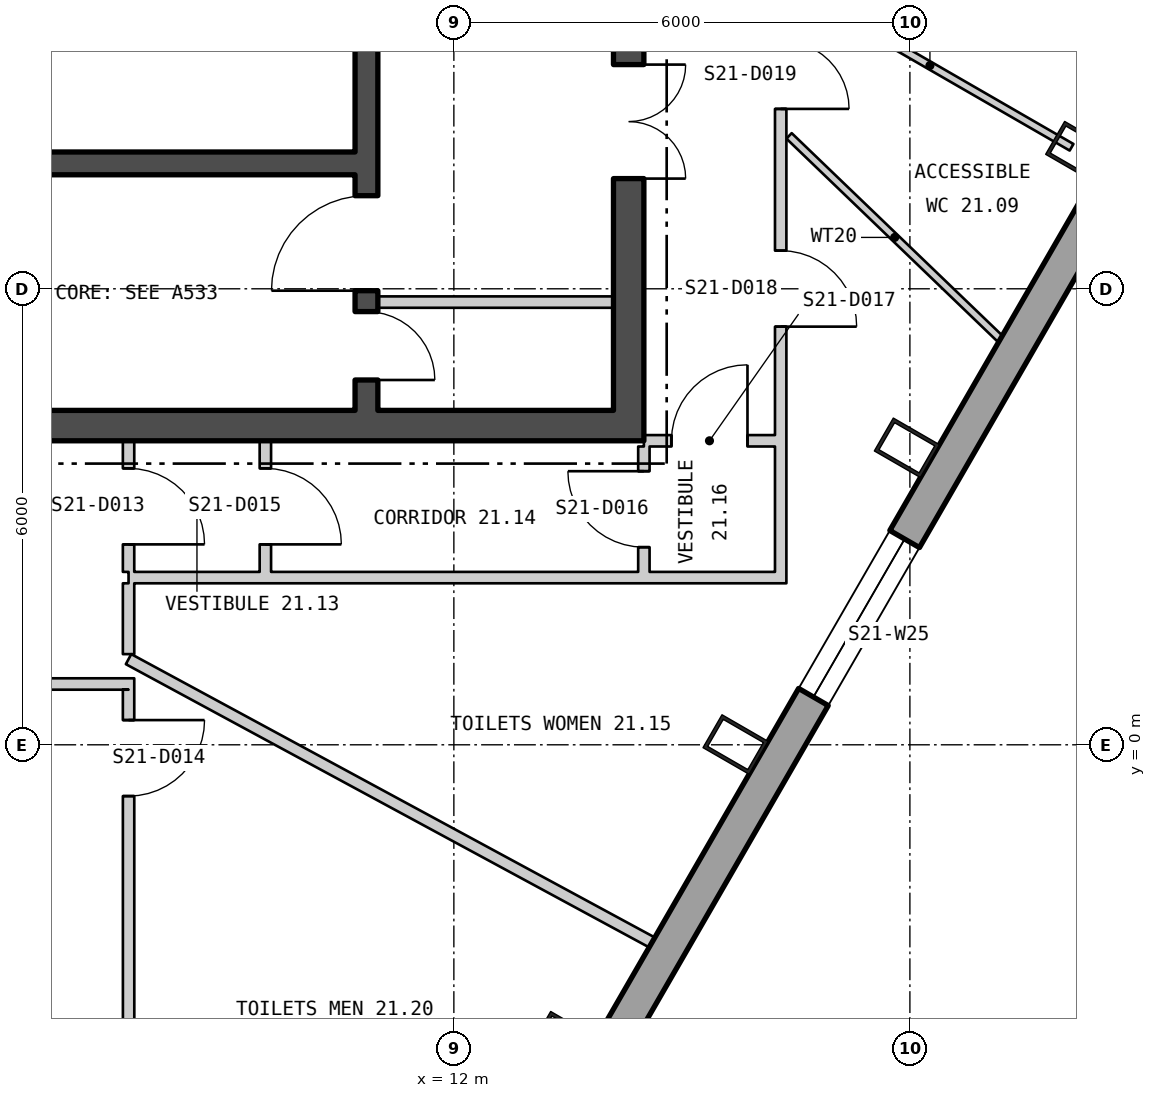
"""IFC4 building model, lengths in metres.
Left out: names, types, materials, properties, quantities, classifications, styles, units other than length and angle.
Written with IfcOpenShell. Run it as: python <this file> out.ifc"""

import sys

from ifc_helpers import new_model, si_unit, direction, frame, frame_2d, origin, origin_2d, place, context, subcontext, project, spatial, polyline, rectangle, hollow_rectangle, outline, extrude, element, fill, save


model = new_model("IFC4")
c1 = context("Model", 3, precision=1e-05, world=origin(), true_north=direction((0.0, 1.0)))
c2 = subcontext(c1, "Body", "Model", "MODEL_VIEW")
j1 = project(units=[si_unit("LENGTHUNIT", "METRE"), si_unit("PLANEANGLEUNIT", "RADIAN")], contexts=[c1])
p1 = place(None, origin())
s1 = spatial("IfcSite", under=j1, at=p1, CompositionType="ELEMENT")
p2 = place(p1, origin())
s2 = spatial("IfcBuilding", under=s1, at=p2, CompositionType="ELEMENT")
p3 = place(p2, frame((0.0, 0.0, 280.5)))
s3 = spatial("IfcBuildingStorey", under=s2, at=p3, CompositionType="ELEMENT", Elevation=280.5)
for number, where, z_axis, x_axis in (
    (1, (13.452, -3.9, 0.0), (0.0, 0.0, 1.0), (0.5, 0.866, 0.0)),
    (2, (15.706, 0.004, 0.0), (0.0, 0.0, 1.0), (0.5, 0.866, 0.0)),
    (3, (17.96, 3.908, 0.0), (0.0, 0.0, 1.0), (0.5, 0.866, 0.0)),
    (4, (20.214, 7.811, 0.0), (0.0, 0.0, 1.0), (0.5, 0.866, 0.0)),
):
    element("IfcColumn", number, at=place(p3, frame(where, z_axis=z_axis, x_axis=x_axis)), inside=s3, PredefinedType="COLUMN", context=c2, shape_type="SweptSolid", body=[
        extrude(hollow_rectangle(XDim=0.5, YDim=0.7, WallThickness=0.045, at=origin_2d()), origin(), (0.0, 0.0, 1.0), 3.9),
    ])
p4 = place(p3, frame((2.515, -23.993, -0.18), z_axis=(0.0, 0.0, 1.0), x_axis=(0.500000711659, 0.866024992908, 0.0)))
e5 = element("IfcWall", 5, at=p4, inside=s3, PredefinedType="SOLIDWALL", context=c2, shape_type="SweptSolid", body=[
    extrude(outline(polyline([(-0.13, -0.225), (45.87, -0.225), (45.61, 0.225), (0.13, 0.225), (-0.13, -0.225)])), origin(), (0.0, 0.0, 1.0), 3.68),
])
p5 = place(p4, frame((1.424, 0.0, 1.08)))
e6 = element("IfcOpeningElement", 6, at=p5, cuts=e5, PredefinedType="OPENING", context=c2, shape_type="SweptSolid", body=[
    extrude(rectangle(XDim=2.4, YDim=2.0, at=frame_2d((1.2, 1.0))), frame((0.0, 0.235, 0.0), z_axis=(0.0, -1.0, 0.0), x_axis=(1.0, 0.0, 0.0)), (0.0, 0.0, 1.0), 0.47),
])
p6 = place(p4, frame((5.893, 0.0, 1.08)))
e7 = element("IfcOpeningElement", 7, at=p6, cuts=e5, PredefinedType="OPENING", context=c2, shape_type="SweptSolid", body=[
    extrude(rectangle(XDim=2.4, YDim=2.0, at=frame_2d((1.2, 1.0))), frame((0.0, 0.235, 0.0), z_axis=(0.0, -1.0, 0.0), x_axis=(1.0, 0.0, 0.0)), (0.0, 0.0, 1.0), 0.47),
])
p7 = place(p4, frame((10.401, 0.0, 1.08)))
e8 = element("IfcOpeningElement", 8, at=p7, cuts=e5, PredefinedType="OPENING", context=c2, shape_type="SweptSolid", body=[
    extrude(rectangle(XDim=2.4, YDim=2.0, at=frame_2d((1.2, 1.0))), frame((0.0, 0.235, 0.0), z_axis=(0.0, -1.0, 0.0), x_axis=(1.0, 0.0, 0.0)), (0.0, 0.0, 1.0), 0.47),
])
p8 = place(p4, frame((14.909, 0.0, 1.08)))
e9 = element("IfcOpeningElement", 9, at=p8, cuts=e5, PredefinedType="OPENING", context=c2, shape_type="SweptSolid", body=[
    extrude(rectangle(XDim=2.4, YDim=2.0, at=frame_2d((1.2, 1.0))), frame((0.0, 0.235, 0.0), z_axis=(0.0, -1.0, 0.0), x_axis=(1.0, 0.0, 0.0)), (0.0, 0.0, 1.0), 0.47),
])
p9 = place(p4, frame((19.416, 0.0, 1.08)))
e10 = element("IfcOpeningElement", 10, at=p9, cuts=e5, PredefinedType="OPENING", context=c2, shape_type="SweptSolid", body=[
    extrude(rectangle(XDim=2.4, YDim=2.0, at=frame_2d((1.2, 1.0))), frame((0.0, 0.235, 0.0), z_axis=(0.0, -1.0, 0.0), x_axis=(1.0, 0.0, 0.0)), (0.0, 0.0, 1.0), 0.47),
])
p10 = place(p4, frame((28.431, 0.0, 1.08)))
e11 = element("IfcOpeningElement", 11, at=p10, cuts=e5, PredefinedType="OPENING", context=c2, shape_type="SweptSolid", body=[
    extrude(rectangle(XDim=2.4, YDim=2.0, at=frame_2d((1.2, 1.0))), frame((0.0, 0.235, 0.0), z_axis=(0.0, -1.0, 0.0), x_axis=(1.0, 0.0, 0.0)), (0.0, 0.0, 1.0), 0.47),
])
p11 = place(p4, frame((37.447, 0.0, 1.08)))
e12 = element("IfcOpeningElement", 12, at=p11, cuts=e5, PredefinedType="OPENING", context=c2, shape_type="SweptSolid", body=[
    extrude(rectangle(XDim=2.4, YDim=2.0, at=frame_2d((1.2, 1.0))), frame((0.0, 0.235, 0.0), z_axis=(0.0, -1.0, 0.0), x_axis=(1.0, 0.0, 0.0)), (0.0, 0.0, 1.0), 0.47),
])
p12 = place(p4, frame((41.916, 0.0, 1.08)))
e13 = element("IfcOpeningElement", 13, at=p12, cuts=e5, PredefinedType="OPENING", context=c2, shape_type="SweptSolid", body=[
    extrude(rectangle(XDim=2.4, YDim=2.0, at=frame_2d((1.2, 1.0))), frame((0.0, 0.235, 0.0), z_axis=(0.0, -1.0, 0.0), x_axis=(1.0, 0.0, 0.0)), (0.0, 0.0, 1.0), 0.47),
])
p13 = place(p3, frame((-14.5, 4.2, 0.0), z_axis=(0.0, 0.0, 1.0), x_axis=(1.0, 0.0, 0.0)))
e14 = element("IfcWall", 14, at=p13, inside=s3, PredefinedType="SHEAR", context=c2, shape_type="SweptSolid", body=[
    extrude(rectangle(XDim=29.0, YDim=0.4, at=frame_2d((14.5, 0.0))), origin(), (0.0, 0.0, 1.0), 3.7),
])
p14 = place(p13, frame((9.0, 0.0, 0.0)))
e15 = element("IfcOpeningElement", 15, at=p14, cuts=e14, PredefinedType="OPENING", context=c2, shape_type="SweptSolid", body=[
    extrude(rectangle(XDim=1.8, YDim=2.4, at=frame_2d((0.9, 1.2))), frame((0.0, 0.21, 0.0), z_axis=(0.0, -1.0, 0.0), x_axis=(1.0, 0.0, 0.0)), (0.0, 0.0, 1.0), 0.42),
])
p15 = place(p13, frame((19.0, 0.0, 0.0)))
e16 = element("IfcOpeningElement", 16, at=p15, cuts=e14, PredefinedType="OPENING", context=c2, shape_type="SweptSolid", body=[
    extrude(rectangle(XDim=1.8, YDim=2.4, at=frame_2d((0.9, 1.2))), frame((0.0, 0.21, 0.0), z_axis=(0.0, -1.0, 0.0), x_axis=(1.0, 0.0, 0.0)), (0.0, 0.0, 1.0), 0.42),
])
p16 = place(p3, frame((14.3, 4.4, 0.0), z_axis=(0.0, 0.0, 1.0), x_axis=(0.0, 1.0, 0.0)))
e17 = element("IfcWall", 17, at=p16, inside=s3, PredefinedType="SHEAR", context=c2, shape_type="SweptSolid", body=[
    extrude(rectangle(XDim=13.2, YDim=0.4, at=frame_2d((6.6, 0.0))), origin(), (0.0, 0.0, 1.0), 3.7),
])
p17 = place(p16, frame((3.05, 0.0, 0.0)))
e18 = element("IfcOpeningElement", 18, at=p17, cuts=e17, PredefinedType="OPENING", context=c2, shape_type="SweptSolid", body=[
    extrude(rectangle(XDim=1.5, YDim=2.1, at=frame_2d((0.75, 1.05))), frame((0.0, 0.21, 0.0), z_axis=(0.0, -1.0, 0.0), x_axis=(1.0, 0.0, 0.0)), (0.0, 0.0, 1.0), 0.42),
])
p18 = place(p3, frame((10.85, 4.4, 0.0), z_axis=(0.0, 0.0, 1.0), x_axis=(0.0, 1.0, 0.0)))
e19 = element("IfcWall", 19, at=p18, inside=s3, PredefinedType="SHEAR", context=c2, shape_type="SweptSolid", body=[
    extrude(rectangle(XDim=13.2, YDim=0.3, at=frame_2d((6.6, 0.0))), origin(), (0.0, 0.0, 1.0), 3.7),
])
p19 = place(p18, frame((1.575, 0.0, 0.0)))
e20 = element("IfcOpeningElement", 20, at=p19, cuts=e19, PredefinedType="OPENING", context=c2, shape_type="SweptSolid", body=[
    extrude(rectangle(XDim=1.25, YDim=2.1, at=frame_2d((0.625, 1.05))), frame((0.0, 0.16, 0.0), z_axis=(0.0, -1.0, 0.0), x_axis=(1.0, 0.0, 0.0)), (0.0, 0.0, 1.0), 0.32),
])
p20 = place(p18, frame((0.4, 0.0, 0.0)))
e21 = element("IfcOpeningElement", 21, at=p20, cuts=e19, PredefinedType="OPENING", context=c2, shape_type="SweptSolid", body=[
    extrude(rectangle(XDim=0.9, YDim=2.1, at=frame_2d((0.45, 1.05))), frame((0.0, 0.16, 0.0), z_axis=(0.0, -1.0, 0.0), x_axis=(1.0, 0.0, 0.0)), (0.0, 0.0, 1.0), 0.32),
])
p21 = place(p3, frame((2.6, 7.65, 0.0), z_axis=(0.0, 0.0, 1.0), x_axis=(1.0, 0.0, 0.0)))
e22 = element("IfcWall", 22, at=p21, inside=s3, PredefinedType="SHEAR", context=c2, shape_type="SweptSolid", body=[
    extrude(rectangle(XDim=8.1, YDim=0.3, at=frame_2d((4.05, 0.0))), origin(), (0.0, 0.0, 1.0), 3.7),
])
p22 = place(p3, frame((11.0, 5.825, 0.0), z_axis=(0.0, 0.0, 1.0), x_axis=(1.0, 0.0, 0.0)))
e23 = element("IfcWall", 23, at=p22, inside=s3, PredefinedType="PARTITIONING", context=c2, shape_type="SweptSolid", body=[
    extrude(rectangle(XDim=3.1, YDim=0.15, at=frame_2d((1.55, 0.0))), origin(), (0.0, 0.0, 1.0), 3.7),
])
p23 = place(p3, frame((-7.72, 0.8, 0.0), z_axis=(0.0, 0.0, 1.0), x_axis=(1.0, 0.0, 0.0)))
e24 = element("IfcWall", 24, at=p23, inside=s3, PredefinedType="PARTITIONING", context=c2, shape_type="SweptSolid", body=[
    extrude(rectangle(XDim=15.515, YDim=0.15, at=frame_2d((7.758, 0.0))), origin(), (0.0, 0.0, 1.0), 3.7),
])
p24 = place(p23, frame((1.206, 0.0, 0.0)))
e25 = element("IfcOpeningElement", 25, at=p24, cuts=e24, PredefinedType="OPENING", context=c2, shape_type="SweptSolid", body=[
    extrude(rectangle(XDim=1.0, YDim=2.1, at=frame_2d((0.5, 1.05))), frame((0.0, 0.085, 0.0), z_axis=(0.0, -1.0, 0.0), x_axis=(1.0, 0.0, 0.0)), (0.0, 0.0, 1.0), 0.17),
])
p25 = place(p23, frame((13.234, 0.0, 0.0)))
e26 = element("IfcOpeningElement", 26, at=p25, cuts=e24, PredefinedType="OPENING", context=c2, shape_type="SweptSolid", body=[
    extrude(rectangle(XDim=1.0, YDim=2.1, at=frame_2d((0.5, 1.05))), frame((0.0, 0.085, 0.0), z_axis=(0.0, -1.0, 0.0), x_axis=(1.0, 0.0, 0.0)), (0.0, 0.0, 1.0), 0.17),
])
p26 = place(p3, frame((7.72, 1.127, 0.0), z_axis=(0.0, 0.0, 1.0), x_axis=(0.879447920674, -0.475995120586, 0.0)))
e27 = element("IfcWall", 27, at=p26, inside=s3, PredefinedType="PARTITIONING", context=c2, shape_type="SweptSolid", body=[
    extrude(rectangle(XDim=7.83, YDim=0.15, at=frame_2d((3.915, 0.0))), origin(), (0.0, 0.0, 1.0), 3.7),
])
p27 = place(p3, frame((7.72, 1.193, 0.0), z_axis=(0.0, 0.0, 1.0), x_axis=(0.0, 1.0, 0.0)))
e28 = element("IfcWall", 28, at=p27, inside=s3, PredefinedType="PARTITIONING", context=c2, shape_type="SweptSolid", body=[
    extrude(rectangle(XDim=0.932, YDim=0.15, at=frame_2d((0.466, 0.0))), origin(), (0.0, 0.0, 1.0), 3.7),
])
p28 = place(p3, frame((7.72, 2.2, 0.0), z_axis=(0.0, 0.0, 1.0), x_axis=(1.0, 0.0, 0.0)))
e29 = element("IfcWall", 29, at=p28, inside=s3, PredefinedType="PARTITIONING", context=c2, shape_type="SweptSolid", body=[
    extrude(rectangle(XDim=8.505, YDim=0.15, at=frame_2d((4.253, 0.0))), origin(), (0.0, 0.0, 1.0), 3.7),
])
p29 = place(p3, frame((7.72, 2.275, 0.0), z_axis=(0.0, 0.0, 1.0), x_axis=(0.0, 1.0, 0.0)))
e30 = element("IfcWall", 30, at=p29, inside=s3, PredefinedType="PARTITIONING", context=c2, shape_type="SweptSolid", body=[
    extrude(rectangle(XDim=1.725, YDim=0.15, at=frame_2d((0.863, 0.0))), origin(), (0.0, 0.0, 1.0), 3.7),
])
p30 = place(p29, frame((0.362, 0.0, 0.0)))
e31 = element("IfcOpeningElement", 31, at=p30, cuts=e30, PredefinedType="OPENING", context=c2, shape_type="SweptSolid", body=[
    extrude(rectangle(XDim=1.0, YDim=2.1, at=frame_2d((0.5, 1.05))), frame((0.0, 0.085, 0.0), z_axis=(0.0, -1.0, 0.0), x_axis=(1.0, 0.0, 0.0)), (0.0, 0.0, 1.0), 0.17),
])
p31 = place(p3, frame((7.72, 0.725, 0.0), z_axis=(0.0, 0.0, 1.0), x_axis=(0.000153657036, -0.999999988195, 0.0)))
e32 = element("IfcWall", 32, at=p31, inside=s3, PredefinedType="PARTITIONING", context=c2, shape_type="SweptSolid", body=[
    extrude(rectangle(XDim=6.508, YDim=0.15, at=frame_2d((3.254, 0.0))), origin(), (0.0, 0.0, 1.0), 3.7),
])
p32 = place(p31, frame((0.4, 0.0, 0.0)))
e33 = element("IfcOpeningElement", 33, at=p32, cuts=e32, PredefinedType="OPENING", context=c2, shape_type="SweptSolid", body=[
    extrude(rectangle(XDim=1.0, YDim=2.1, at=frame_2d((0.5, 1.05))), frame((0.0, 0.085, 0.0), z_axis=(0.0, -1.0, 0.0), x_axis=(1.0, 0.0, 0.0)), (0.0, 0.0, 1.0), 0.17),
])
p33 = place(p3, frame((9.52, 2.275, 0.0), z_axis=(0.0, 0.0, 1.0), x_axis=(0.0, 1.0, 0.0)))
e34 = element("IfcWall", 34, at=p33, inside=s3, PredefinedType="PARTITIONING", context=c2, shape_type="SweptSolid", body=[
    extrude(rectangle(XDim=1.725, YDim=0.15, at=frame_2d((0.863, 0.0))), origin(), (0.0, 0.0, 1.0), 3.2),
])
p34 = place(p33, frame((0.362, 0.0, 0.0)))
e35 = element("IfcOpeningElement", 35, at=p34, cuts=e34, PredefinedType="OPENING", context=c2, shape_type="SweptSolid", body=[
    extrude(rectangle(XDim=1.0, YDim=2.1, at=frame_2d((0.5, 1.05))), frame((0.0, 0.085, 0.0), z_axis=(0.0, -1.0, 0.0), x_axis=(1.0, 0.0, 0.0)), (0.0, 0.0, 1.0), 0.17),
])
p35 = place(p3, frame((14.5, 2.275, 0.0), z_axis=(0.0, 0.0, 1.0), x_axis=(0.0, 1.0, 0.0)))
e36 = element("IfcWall", 36, at=p35, inside=s3, PredefinedType="PARTITIONING", context=c2, shape_type="SweptSolid", body=[
    extrude(rectangle(XDim=1.65, YDim=0.15, at=frame_2d((0.825, 0.0))), origin(), (0.0, 0.0, 1.0), 3.7),
])
p36 = place(p35, frame((0.325, 0.0, 0.0)))
e37 = element("IfcOpeningElement", 37, at=p36, cuts=e36, PredefinedType="OPENING", context=c2, shape_type="SweptSolid", body=[
    extrude(rectangle(XDim=1.0, YDim=2.1, at=frame_2d((0.5, 1.05))), frame((0.0, 0.085, 0.0), z_axis=(0.0, -1.0, 0.0), x_axis=(1.0, 0.0, 0.0)), (0.0, 0.0, 1.0), 0.17),
])
p37 = place(p3, frame((14.5, 4.0, 0.0), z_axis=(0.0, 0.0, 1.0), x_axis=(1.0, 0.0, 0.0)))
e38 = element("IfcWall", 38, at=p37, inside=s3, PredefinedType="PARTITIONING", context=c2, shape_type="SweptSolid", body=[
    extrude(rectangle(XDim=1.725, YDim=0.15, at=frame_2d((0.863, 0.0))), origin(), (0.0, 0.0, 1.0), 3.16),
])
p38 = place(p37, frame((0.363, 0.0, 0.0)))
e39 = element("IfcOpeningElement", 39, at=p38, cuts=e38, PredefinedType="OPENING", context=c2, shape_type="SweptSolid", body=[
    extrude(rectangle(XDim=1.0, YDim=2.1, at=frame_2d((0.5, 1.05))), frame((0.0, 0.085, 0.0), z_axis=(0.0, -1.0, 0.0), x_axis=(1.0, 0.0, 0.0)), (0.0, 0.0, 1.0), 0.17),
])
p39 = place(p3, frame((16.3, 2.125, 0.0), z_axis=(0.0, 0.0, 1.0), x_axis=(0.0, 1.0, 0.0)))
e40 = element("IfcWall", 40, at=p39, inside=s3, PredefinedType="PARTITIONING", context=c2, shape_type="SweptSolid", body=[
    extrude(rectangle(XDim=17.623, YDim=0.15, at=frame_2d((8.812, 0.0))), origin(), (0.0, 0.0, 1.0), 3.7),
])
p40 = place(p39, frame((3.377, 0.0, 0.0)))
e41 = element("IfcOpeningElement", 41, at=p40, cuts=e40, PredefinedType="OPENING", context=c2, shape_type="SweptSolid", body=[
    extrude(rectangle(XDim=1.0, YDim=2.1, at=frame_2d((0.5, 1.05))), frame((0.0, 0.085, 0.0), z_axis=(0.0, -1.0, 0.0), x_axis=(1.0, 0.0, 0.0)), (0.0, 0.0, 1.0), 0.17),
])
p41 = place(p39, frame((6.242, 0.0, 0.0)))
e42 = element("IfcOpeningElement", 42, at=p41, cuts=e40, PredefinedType="OPENING", context=c2, shape_type="SweptSolid", body=[
    extrude(rectangle(XDim=0.9, YDim=2.1, at=frame_2d((0.45, 1.05))), frame((0.0, 0.085, 0.0), z_axis=(0.0, -1.0, 0.0), x_axis=(1.0, 0.0, 0.0)), (0.0, 0.0, 1.0), 0.17),
])
p42 = place(p39, frame((9.05, 0.0, 0.0)))
e43 = element("IfcOpeningElement", 43, at=p42, cuts=e40, PredefinedType="OPENING", context=c2, shape_type="SweptSolid", body=[
    extrude(rectangle(XDim=1.0, YDim=2.1, at=frame_2d((0.5, 1.05))), frame((0.0, 0.085, 0.0), z_axis=(0.0, -1.0, 0.0), x_axis=(1.0, 0.0, 0.0)), (0.0, 0.0, 1.0), 0.17),
])
p43 = place(p39, frame((13.764, 0.0, 0.0)))
e44 = element("IfcOpeningElement", 44, at=p43, cuts=e40, PredefinedType="OPENING", context=c2, shape_type="SweptSolid", body=[
    extrude(rectangle(XDim=1.0, YDim=2.1, at=frame_2d((0.5, 1.05))), frame((0.0, 0.085, 0.0), z_axis=(0.0, -1.0, 0.0), x_axis=(1.0, 0.0, 0.0)), (0.0, 0.0, 1.0), 0.17),
])
p44 = place(p3, frame((16.4, 10.013, 0.0), z_axis=(0.0, 0.0, 1.0), x_axis=(0.866104329613, -0.499863271531, 0.0)))
e45 = element("IfcWall", 45, at=p44, inside=s3, PredefinedType="PARTITIONING", context=c2, shape_type="SweptSolid", body=[
    extrude(rectangle(XDim=4.303, YDim=0.1, at=frame_2d((2.152, 0.0))), origin(), (0.0, 0.0, 1.0), 3.7),
])
p45 = place(p3, frame((16.41, 8.012, 0.0), z_axis=(0.0, 0.0, 1.0), x_axis=(0.720972589003, -0.692963581948, 0.0)))
e46 = element("IfcWall", 46, at=p45, inside=s3, PredefinedType="PARTITIONING", context=c2, shape_type="SweptSolid", body=[
    extrude(rectangle(XDim=3.856, YDim=0.1, at=frame_2d((1.928, 0.0))), origin(), (0.0, 0.0, 1.0), 3.7),
])
p46 = place(p10, origin())
e47 = element("IfcWindow", 47, at=p46, inside=s3, PartitioningType="SINGLE_PANEL", PredefinedType="WINDOW", context=c2, shape_type="SweptSolid", body=[
    extrude(rectangle(XDim=2.4, YDim=2.0, at=frame_2d((1.2, 1.0))), frame((0.0, 0.105, 0.0), z_axis=(0.0, -1.0, 0.0), x_axis=(1.0, 0.0, 0.0)), (0.0, 0.0, 1.0), 0.06),
])
fill(e11, e47)
p47 = place(p19, origin())
e48 = element("IfcDoor", 48, at=p47, inside=s3, OperationType="SINGLE_SWING_RIGHT", PredefinedType="DOOR", context=c2, shape_type="SweptSolid", body=[
    extrude(rectangle(XDim=1.25, YDim=2.1, at=frame_2d((0.625, 1.05))), frame((0.0, 0.025, 0.0), z_axis=(0.0, -1.0, 0.0), x_axis=(1.0, 0.0, 0.0)), (0.0, 0.0, 1.0), 0.05),
])
fill(e20, e48)
p48 = place(p17, origin())
e49 = element("IfcDoor", 49, at=p48, inside=s3, OperationType="DOUBLE_DOOR_SINGLE_SWING", PredefinedType="DOOR", context=c2, shape_type="SweptSolid", body=[
    extrude(rectangle(XDim=1.5, YDim=2.1, at=frame_2d((0.75, 1.05))), frame((0.0, 0.025, 0.0), z_axis=(0.0, -1.0, 0.0), x_axis=(1.0, 0.0, 0.0)), (0.0, 0.0, 1.0), 0.05),
])
fill(e18, e49)
p49 = place(p20, origin())
e50 = element("IfcDoor", 50, at=p49, inside=s3, OperationType="SINGLE_SWING_LEFT", PredefinedType="DOOR", context=c2, shape_type="SweptSolid", body=[
    extrude(rectangle(XDim=0.9, YDim=2.1, at=frame_2d((0.45, 1.05))), frame((0.0, 0.025, 0.0), z_axis=(0.0, -1.0, 0.0), x_axis=(1.0, 0.0, 0.0)), (0.0, 0.0, 1.0), 0.05),
])
fill(e21, e50)
p50 = place(p30, origin())
e51 = element("IfcDoor", 51, at=p50, inside=s3, OperationType="SINGLE_SWING_LEFT", PredefinedType="DOOR", context=c2, shape_type="SweptSolid", body=[
    extrude(rectangle(XDim=1.0, YDim=2.1, at=frame_2d((0.5, 1.05))), frame((0.0, 0.025, 0.0), z_axis=(0.0, -1.0, 0.0), x_axis=(1.0, 0.0, 0.0)), (0.0, 0.0, 1.0), 0.05),
])
fill(e31, e51)
p51 = place(p32, origin())
e52 = element("IfcDoor", 52, at=p51, inside=s3, OperationType="SINGLE_SWING_RIGHT", PredefinedType="DOOR", context=c2, shape_type="SweptSolid", body=[
    extrude(rectangle(XDim=1.0, YDim=2.1, at=frame_2d((0.5, 1.05))), frame((0.0, 0.025, 0.0), z_axis=(0.0, -1.0, 0.0), x_axis=(1.0, 0.0, 0.0)), (0.0, 0.0, 1.0), 0.05),
])
fill(e33, e52)
p52 = place(p34, origin())
e53 = element("IfcDoor", 53, at=p52, inside=s3, OperationType="SINGLE_SWING_LEFT", PredefinedType="DOOR", context=c2, shape_type="SweptSolid", body=[
    extrude(rectangle(XDim=1.0, YDim=2.1, at=frame_2d((0.5, 1.05))), frame((0.0, 0.025, 0.0), z_axis=(0.0, -1.0, 0.0), x_axis=(1.0, 0.0, 0.0)), (0.0, 0.0, 1.0), 0.05),
])
fill(e35, e53)
p53 = place(p36, origin())
e54 = element("IfcDoor", 54, at=p53, inside=s3, OperationType="SINGLE_SWING_LEFT", PredefinedType="DOOR", context=c2, shape_type="SweptSolid", body=[
    extrude(rectangle(XDim=1.0, YDim=2.1, at=frame_2d((0.5, 1.05))), frame((0.0, 0.025, 0.0), z_axis=(0.0, -1.0, 0.0), x_axis=(1.0, 0.0, 0.0)), (0.0, 0.0, 1.0), 0.05),
])
fill(e37, e54)
p54 = place(p38, origin())
e55 = element("IfcDoor", 55, at=p54, inside=s3, OperationType="SINGLE_SWING_LEFT", PredefinedType="DOOR", context=c2, shape_type="SweptSolid", body=[
    extrude(rectangle(XDim=1.0, YDim=2.1, at=frame_2d((0.5, 1.05))), frame((0.0, 0.025, 0.0), z_axis=(0.0, -1.0, 0.0), x_axis=(1.0, 0.0, 0.0)), (0.0, 0.0, 1.0), 0.05),
])
fill(e39, e55)
p55 = place(p40, origin())
e56 = element("IfcDoor", 56, at=p55, inside=s3, OperationType="SINGLE_SWING_LEFT", PredefinedType="DOOR", context=c2, shape_type="SweptSolid", body=[
    extrude(rectangle(XDim=1.0, YDim=2.1, at=frame_2d((0.5, 1.05))), frame((0.0, 0.025, 0.0), z_axis=(0.0, -1.0, 0.0), x_axis=(1.0, 0.0, 0.0)), (0.0, 0.0, 1.0), 0.05),
])
fill(e41, e56)
p56 = place(p41, origin())
e57 = element("IfcDoor", 57, at=p56, inside=s3, OperationType="SINGLE_SWING_LEFT", PredefinedType="DOOR", context=c2, shape_type="SweptSolid", body=[
    extrude(rectangle(XDim=0.9, YDim=2.1, at=frame_2d((0.45, 1.05))), frame((0.0, 0.025, 0.0), z_axis=(0.0, -1.0, 0.0), x_axis=(1.0, 0.0, 0.0)), (0.0, 0.0, 1.0), 0.05),
])
fill(e42, e57)
save(model, sys.argv[1])
